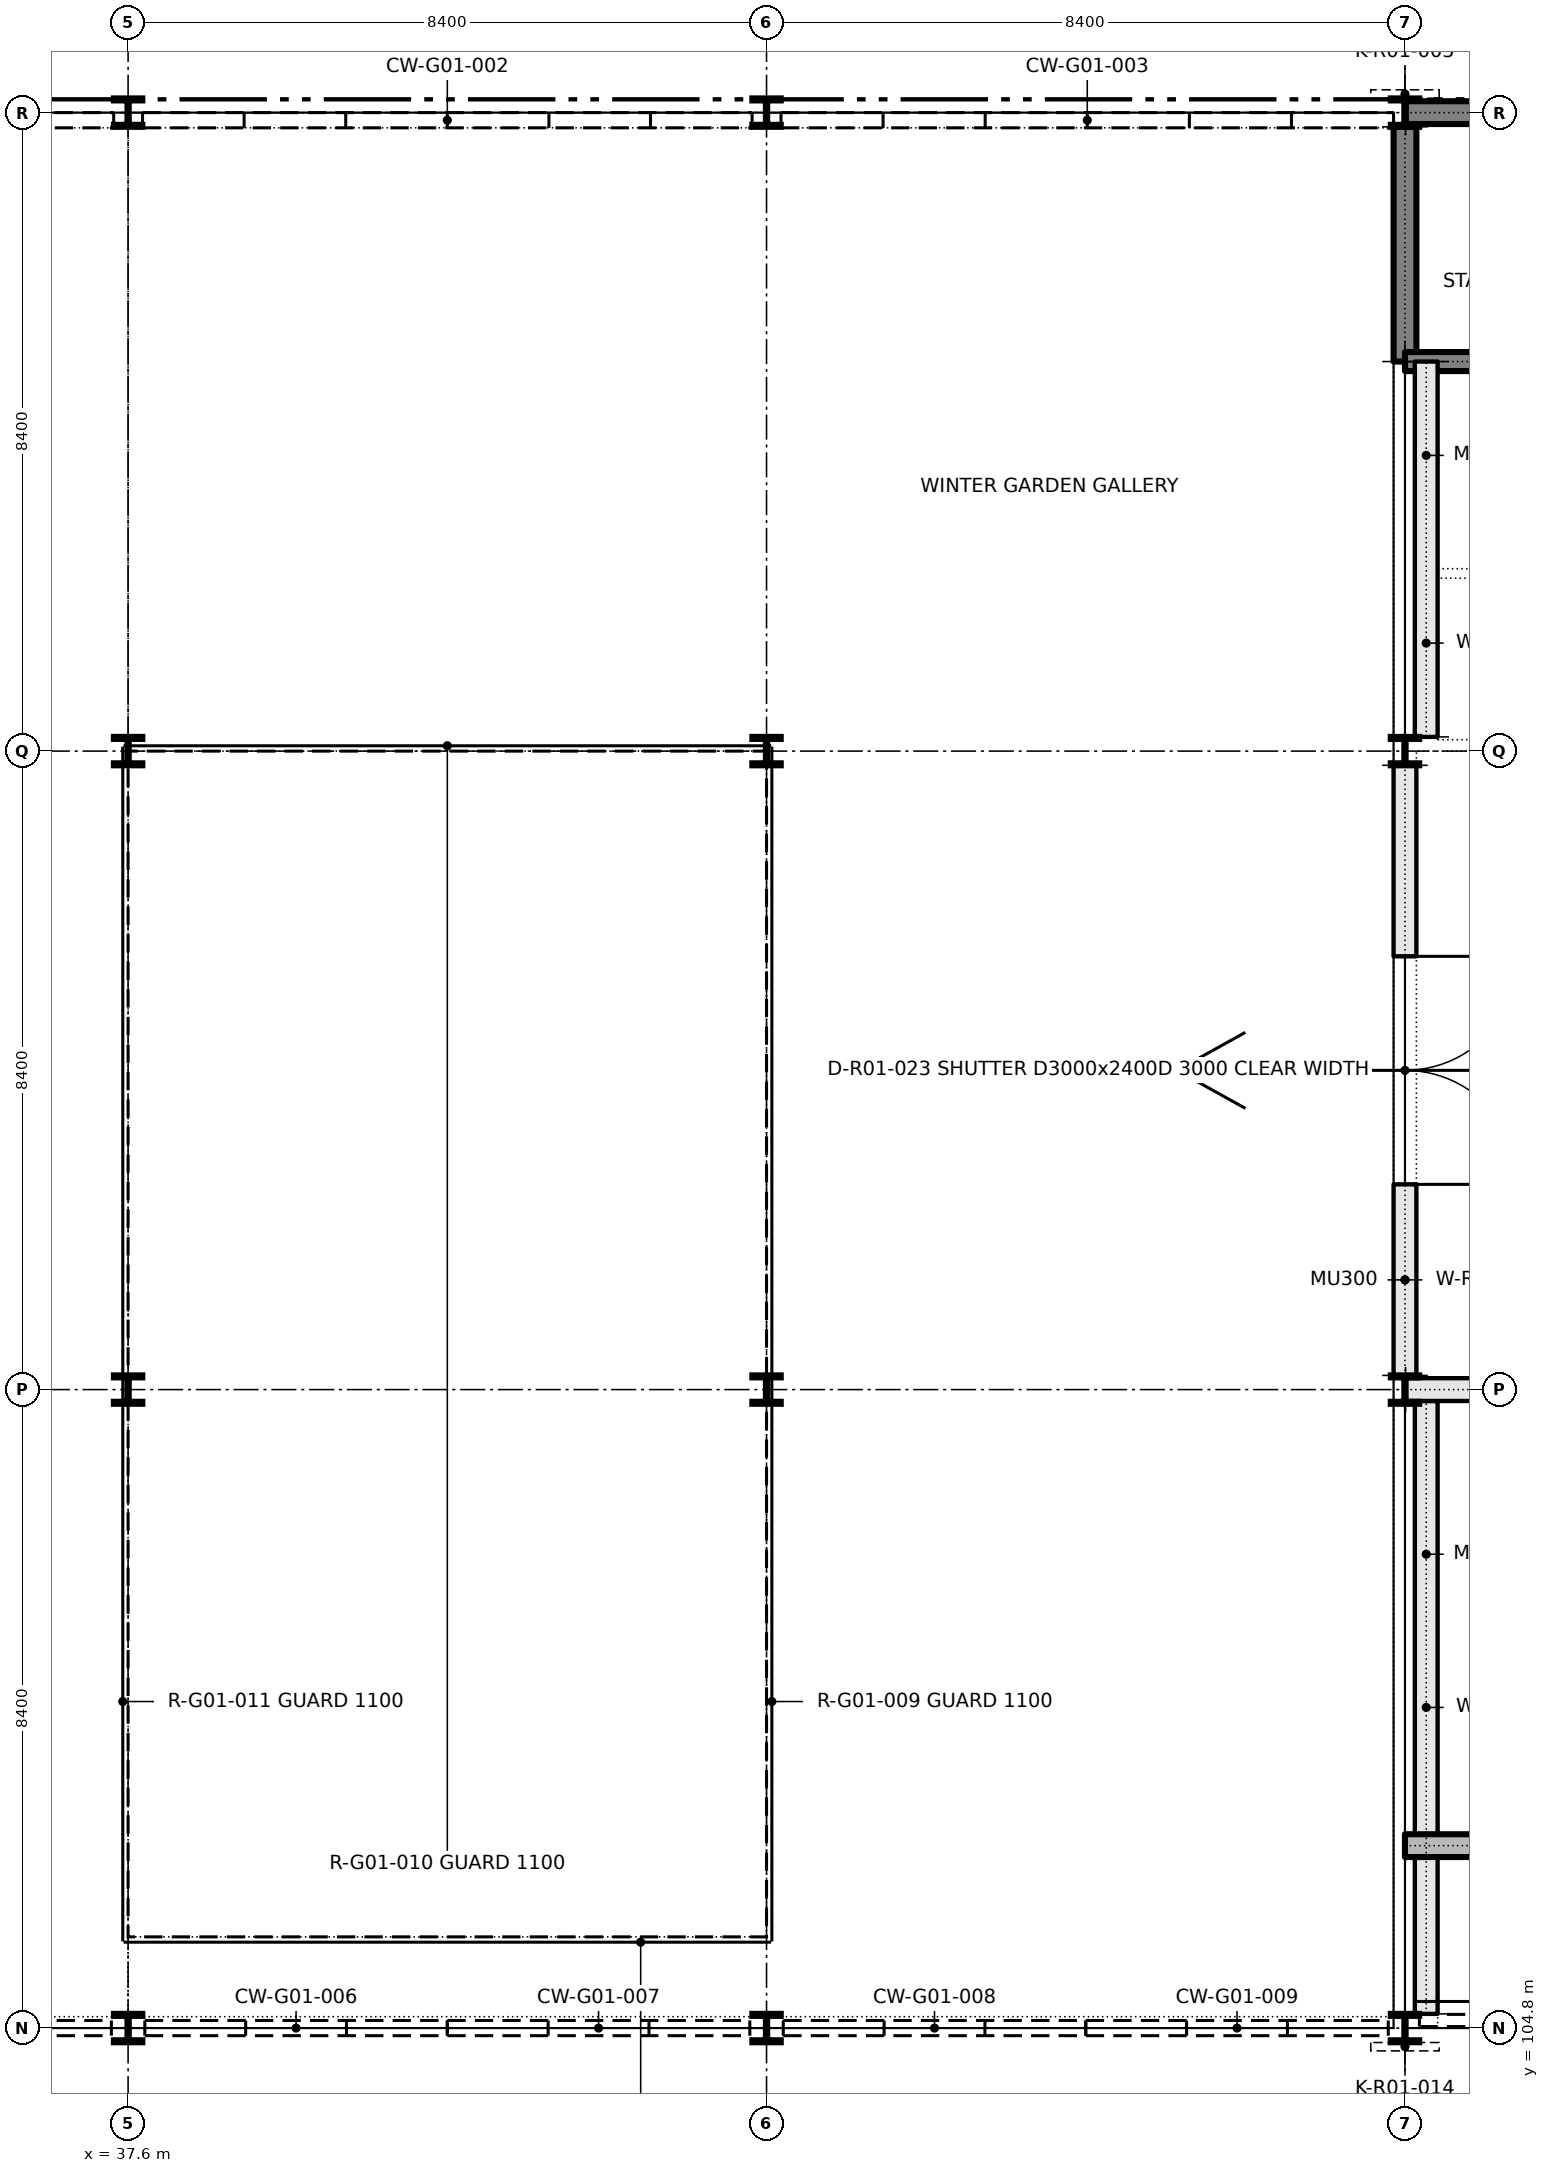
"""IFC4 building model, lengths in metres.
Left out: names, types, materials, properties, quantities, classifications, styles, units other than length and angle.
Written with IfcOpenShell. Run it as: python <this file> out.ifc"""

import sys

from ifc_helpers import new_model, si_unit, direction, frame, frame_2d, origin, origin_2d, place, context, subcontext, project, spatial, rectangle, i_section, extrude, element, fill, save


model = new_model("IFC4")
c1 = context("Model", 3, precision=1e-05, world=origin(), true_north=direction((0.0, 1.0)))
c2 = subcontext(c1, "Body", "Model", "MODEL_VIEW")
j1 = project(units=[si_unit("LENGTHUNIT", "METRE"), si_unit("PLANEANGLEUNIT", "RADIAN")], contexts=[c1])
p1 = place(None, origin())
s1 = spatial("IfcSite", under=j1, at=p1, CompositionType="ELEMENT")
p2 = place(p1, origin())
s2 = spatial("IfcBuilding", under=s1, at=p2, CompositionType="ELEMENT")
p3 = place(p2, frame((0.0, 0.0, 5.4)))
s3 = spatial("IfcBuildingStorey", under=s2, at=p3, CompositionType="ELEMENT", Elevation=5.4)
for number, where, z_axis, x_axis in (
    (1, (54.4, 104.8, 0.0), (0.0, 0.0, 1.0), (1.0, 0.0, 0.0)),
    (2, (54.4, 113.2, 0.0), (0.0, 0.0, 1.0), (1.0, 0.0, 0.0)),
    (3, (54.4, 121.6, 0.0), (0.0, 0.0, 1.0), (1.0, 0.0, 0.0)),
    (4, (54.4, 130.0, 0.0), (0.0, 0.0, 1.0), (1.0, 0.0, 0.0)),
):
    element("IfcColumn", number, at=place(p3, frame(where, z_axis=z_axis, x_axis=x_axis)), inside=s3, PredefinedType="COLUMN", context=c2, shape_type="SweptSolid", body=[
        extrude(i_section(OverallWidth=0.373, OverallDepth=0.373, WebThickness=0.016, FlangeThickness=0.026, FilletRadius=0.015, at=origin_2d()), origin(), (0.0, 0.0, 1.0), 4.8),
    ])
p4 = place(p3, frame((54.4, 126.725, 0.0), z_axis=(0.0, 0.0, 1.0), x_axis=(0.0, 1.0, 0.0)))
e5 = element("IfcWall", 5, at=p4, inside=s3, PredefinedType="SHEAR", context=c2, shape_type="SweptSolid", body=[
    extrude(rectangle(XDim=3.088, YDim=0.3, at=frame_2d((1.544, 0.0))), origin(), (0.0, 0.0, 1.0), 4.8),
])
p5 = place(p3, frame((54.4, 126.725, 0.0), z_axis=(0.0, 0.0, 1.0), x_axis=(1.0, 0.0, 0.0)))
e6 = element("IfcWall", 6, at=p5, inside=s3, PredefinedType="SHEAR", context=c2, shape_type="SweptSolid", body=[
    extrude(rectangle(XDim=8.4, YDim=0.25, at=frame_2d((4.2, 0.0))), origin(), (0.0, 0.0, 1.0), 4.8),
])
p6 = place(p5, frame((6.525, 0.0, 0.0)))
e7 = element("IfcOpeningElement", 7, at=p6, cuts=e6, PredefinedType="OPENING", context=c2, shape_type="SweptSolid", body=[
    extrude(rectangle(XDim=1.2, YDim=2.1, at=frame_2d((0.6, 1.05))), frame((0.0, 0.135, 0.0), z_axis=(0.0, -1.0, 0.0), x_axis=(1.0, 0.0, 0.0)), (0.0, 0.0, 1.0), 0.27),
])
p7 = place(p3, frame((54.408, 130.0, 0.0), z_axis=(0.0, 0.0, 1.0), x_axis=(1.0, 0.0, 0.0)))
e8 = element("IfcWall", 8, at=p7, inside=s3, PredefinedType="SHEAR", context=c2, shape_type="SweptSolid", body=[
    extrude(rectangle(XDim=8.4, YDim=0.3, at=frame_2d((4.2, 0.0))), origin(), (0.0, 0.0, 1.0), 4.8),
])
for number, where, z_axis, x_axis in (
    (9, (37.6, 104.8, 0.0), (0.0, 0.0, 1.0), (1.0, 0.0, 0.0)),
    (10, (37.6, 113.2, 0.0), (0.0, 0.0, 1.0), (1.0, 0.0, 0.0)),
    (11, (37.6, 121.6, 0.0), (0.0, 0.0, 1.0), (1.0, 0.0, 0.0)),
    (12, (37.6, 130.0, 0.0), (0.0, 0.0, 1.0), (1.0, 0.0, 0.0)),
    (13, (46.0, 104.8, 0.0), (0.0, 0.0, 1.0), (1.0, 0.0, 0.0)),
    (14, (46.0, 113.2, 0.0), (0.0, 0.0, 1.0), (1.0, 0.0, 0.0)),
    (15, (46.0, 121.6, 0.0), (0.0, 0.0, 1.0), (1.0, 0.0, 0.0)),
    (16, (46.0, 130.0, 0.0), (0.0, 0.0, 1.0), (1.0, 0.0, 0.0)),
):
    element("IfcColumn", number, at=place(p3, frame(where, z_axis=z_axis, x_axis=x_axis)), inside=s3, PredefinedType="COLUMN", context=c2, shape_type="SweptSolid", body=[
        extrude(i_section(OverallWidth=0.373, OverallDepth=0.373, WebThickness=0.016, FlangeThickness=0.026, FilletRadius=0.015, at=origin_2d()), origin(), (0.0, 0.0, 1.0), 4.8),
    ])
p8 = place(p3, frame((54.68, 104.987, 0.0), z_axis=(0.0, 0.0, 1.0), x_axis=(0.0, 1.0, 0.0)))
e17 = element("IfcWall", 17, at=p8, inside=s3, PredefinedType="SOLIDWALL", context=c2, shape_type="SweptSolid", body=[
    extrude(rectangle(XDim=8.063, YDim=0.3, at=frame_2d((4.032, 0.0))), origin(), (0.0, 0.0, 1.0), 4.8),
])
p9 = place(p3, frame((54.4, 113.387, 0.0), z_axis=(0.0, 0.0, 1.0), x_axis=(0.0, 1.0, 0.0)))
e18 = element("IfcWall", 18, at=p9, inside=s3, PredefinedType="SOLIDWALL", context=c2, shape_type="SweptSolid", body=[
    extrude(rectangle(XDim=8.027, YDim=0.3, at=frame_2d((4.013, 0.0))), origin(), (0.0, 0.0, 1.0), 4.087),
])
p10 = place(p9, frame((2.513, 0.0, 0.0)))
e19 = element("IfcOpeningElement", 19, at=p10, cuts=e18, PredefinedType="OPENING", context=c2, shape_type="SweptSolid", body=[
    extrude(rectangle(XDim=3.0, YDim=2.4, at=frame_2d((1.5, 1.2))), frame((0.0, 0.16, 0.0), z_axis=(0.0, -1.0, 0.0), x_axis=(1.0, 0.0, 0.0)), (0.0, 0.0, 1.0), 0.32),
])
p11 = place(p3, frame((54.68, 121.787, 0.0), z_axis=(0.0, 0.0, 1.0), x_axis=(0.0, 1.0, 0.0)))
e20 = element("IfcWall", 20, at=p11, inside=s3, PredefinedType="SOLIDWALL", context=c2, shape_type="SweptSolid", body=[
    extrude(rectangle(XDim=4.938, YDim=0.3, at=frame_2d((2.469, 0.0))), origin(), (0.0, 0.0, 1.0), 4.8),
])
p12 = place(p3, frame((54.4, 107.2, 0.0), z_axis=(0.0, 0.0, 1.0), x_axis=(1.0, 0.0, 0.0)))
e21 = element("IfcWall", 21, at=p12, inside=s3, PredefinedType="SOLIDWALL", context=c2, shape_type="SweptSolid", body=[
    extrude(rectangle(XDim=8.4, YDim=0.3, at=frame_2d((4.2, 0.0))), origin(), (0.0, 0.0, 1.0), 4.8),
])
p13 = place(p12, frame((3.25, 0.0, 0.0)))
e22 = element("IfcOpeningElement", 22, at=p13, cuts=e21, PredefinedType="OPENING", context=c2, shape_type="SweptSolid", body=[
    extrude(rectangle(XDim=1.8, YDim=2.1, at=frame_2d((0.9, 1.05))), frame((0.0, 0.16, 0.0), z_axis=(0.0, -1.0, 0.0), x_axis=(1.0, 0.0, 0.0)), (0.0, 0.0, 1.0), 0.32),
])
p14 = place(p3, frame((54.408, 113.2, 0.0), z_axis=(0.0, 0.0, 1.0), x_axis=(1.0, 0.0, 0.0)))
e23 = element("IfcWall", 23, at=p14, inside=s3, PredefinedType="PARTITIONING", context=c2, shape_type="SweptSolid", body=[
    extrude(rectangle(XDim=8.4, YDim=0.3, at=frame_2d((4.2, 0.0))), origin(), (0.0, 0.0, 1.0), 4.008),
])
p15 = place(p14, frame((3.642, 0.0, 0.0)))
e24 = element("IfcOpeningElement", 24, at=p15, cuts=e23, PredefinedType="OPENING", context=c2, shape_type="SweptSolid", body=[
    extrude(rectangle(XDim=1.0, YDim=2.1, at=frame_2d((0.5, 1.05))), frame((0.0, 0.16, 0.0), z_axis=(0.0, -1.0, 0.0), x_axis=(1.0, 0.0, 0.0)), (0.0, 0.0, 1.0), 0.32),
])
p16 = place(p10, frame((3.0, 0.0, 0.0), z_axis=(0.0, 0.0, 1.0), x_axis=(-1.0, 0.0, 0.0)))
e25 = element("IfcDoor", 25, at=p16, inside=s3, OperationType="DOUBLE_DOOR_SINGLE_SWING", PredefinedType="DOOR", context=c2, shape_type="SweptSolid", body=[
    extrude(rectangle(XDim=3.0, YDim=2.4, at=frame_2d((1.5, 1.2))), frame((0.0, 0.025, 0.0), z_axis=(0.0, -1.0, 0.0), x_axis=(1.0, 0.0, 0.0)), (0.0, 0.0, 1.0), 0.05),
])
fill(e19, e25)
save(model, sys.argv[1])
